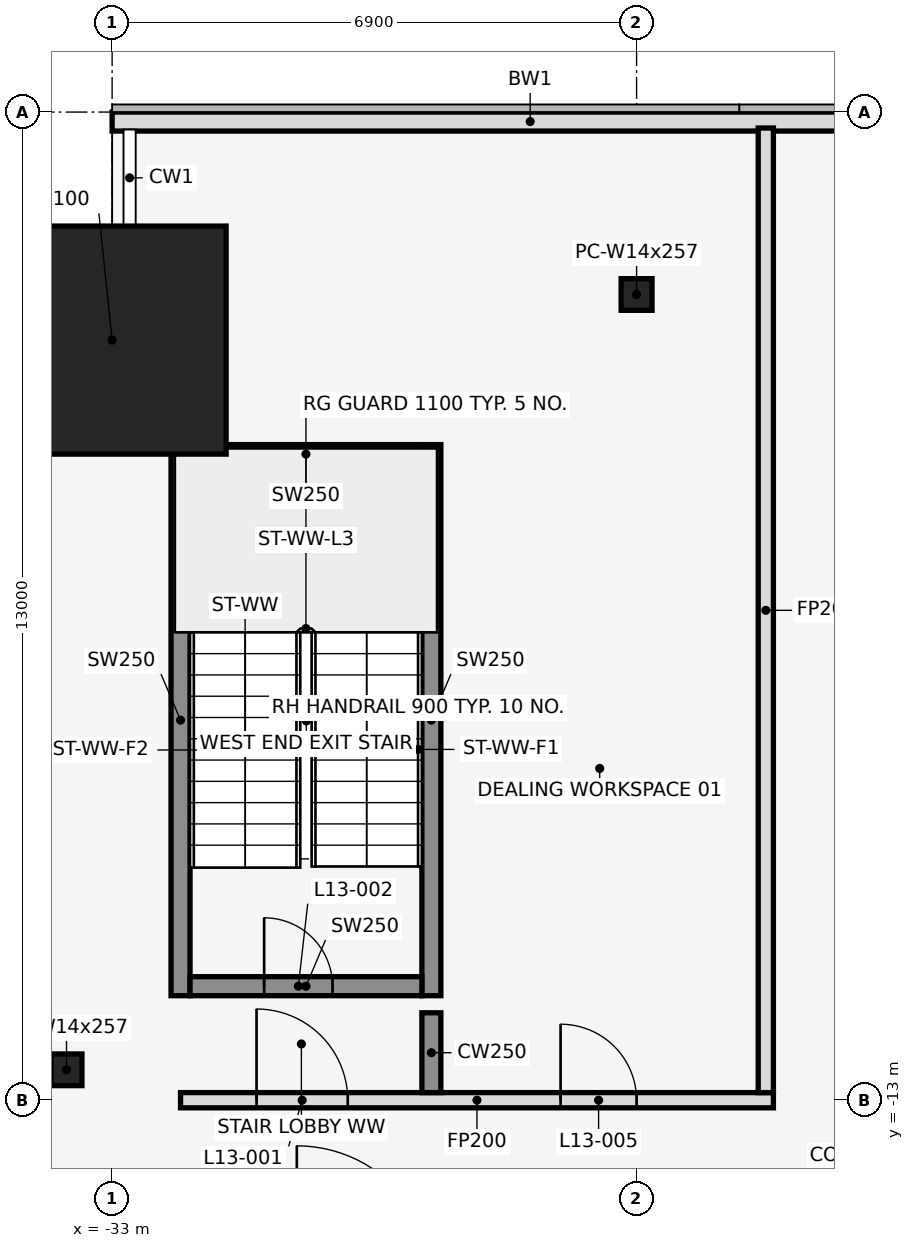
"""IFC4 building model, lengths in metres.
Left out: names, types, materials, properties, quantities, classifications, styles, units other than length and angle.
Written with IfcOpenShell. Run it as: python <this file> out.ifc"""

import sys

from ifc_helpers import new_model, si_unit, direction, frame, frame_2d, origin, origin_2d, place, context, subcontext, project, spatial, rectangle, hollow_rectangle, i_section, extrude, element, fill, save


model = new_model("IFC4")
c1 = context("Model", 3, precision=1e-05, world=origin(), true_north=direction((0.0, 1.0)))
c2 = subcontext(c1, "Body", "Model", "MODEL_VIEW")
j1 = project(units=[si_unit("LENGTHUNIT", "METRE"), si_unit("PLANEANGLEUNIT", "RADIAN")], contexts=[c1])
p1 = place(None, origin())
s1 = spatial("IfcSite", under=j1, at=p1, CompositionType="ELEMENT")
p2 = place(p1, origin())
s2 = spatial("IfcBuilding", under=s1, at=p2, CompositionType="ELEMENT")
p3 = place(p2, frame((0.0, 0.0, 66.5)))
s3 = spatial("IfcBuildingStorey", under=s2, at=p3, CompositionType="ELEMENT", Elevation=66.5)
p4 = place(p3, frame((-33.0, -3.0, 0.0), z_axis=(0.0, 0.0, 1.0), x_axis=(1.0, 0.0, 0.0)))
e1 = element("IfcColumn", 1, at=p4, inside=s3, PredefinedType="COLUMN", context=c2, shape_type="SweptSolid", body=[
    extrude(hollow_rectangle(XDim=3.0, YDim=3.0, WallThickness=0.1, at=origin_2d()), origin(), (0.0, 0.0, 1.0), 4.5),
])
for number, where, z_axis, x_axis in (
    (2, (-26.1, -2.4, 0.0), (0.0, 0.0, 1.0), (1.0, 0.0, 0.0)),
    (3, (-33.6, -12.6, 0.0), (0.0, 0.0, 1.0), (1.0, 0.0, 0.0)),
):
    element("IfcColumn", number, at=place(p3, frame(where, z_axis=z_axis, x_axis=x_axis)), inside=s3, PredefinedType="COLUMN", context=c2, shape_type="SweptSolid", body=[
        extrude(i_section(OverallWidth=0.406, OverallDepth=0.417, WebThickness=0.03, FlangeThickness=0.048, at=origin_2d()), origin(), (0.0, 0.0, 1.0), 4.5),
    ])
p5 = place(p3, frame((-22.0, -0.125, 0.0), z_axis=(0.0, 0.0, 1.0), x_axis=(-1.0, 0.0, 0.0)))
e4 = element("IfcWall", 4, at=p5, inside=s3, PredefinedType="STANDARD", context=c2, shape_type="SweptSolid", body=[
    extrude(rectangle(XDim=11.0, YDim=0.25, at=frame_2d((5.5, 0.0))), origin(), (0.0, 0.0, 1.0), 4.35),
])
for number, where, z_axis, x_axis in (
    (5, (-32.1, -11.625, 0.0), (0.0, 0.0, 1.0), (0.0, 1.0, 0.0)),
    (6, (-28.8, -11.625, 0.0), (0.0, 0.0, 1.0), (0.0, 1.0, 0.0)),
):
    element("IfcWall", number, at=place(p3, frame(where, z_axis=z_axis, x_axis=x_axis)), inside=s3, PredefinedType="SHEAR", context=c2, shape_type="SweptSolid", body=[
        extrude(rectangle(XDim=7.25, YDim=0.25, at=frame_2d((3.625, 0.0))), origin(), (0.0, 0.0, 1.0), 4.5),
    ])
p6 = place(p3, frame((-31.975, -11.5, 0.0), z_axis=(0.0, 0.0, 1.0), x_axis=(1.0, 0.0, 0.0)))
e7 = element("IfcWall", 7, at=p6, inside=s3, PredefinedType="SHEAR", context=c2, shape_type="SweptSolid", body=[
    extrude(rectangle(XDim=3.05, YDim=0.25, at=frame_2d((1.525, 0.0))), origin(), (0.0, 0.0, 1.0), 4.5),
])
p7 = place(p6, frame((0.975, 0.0, 0.0)))
e8 = element("IfcOpeningElement", 8, at=p7, cuts=e7, PredefinedType="OPENING", context=c2, shape_type="SweptSolid", body=[
    extrude(rectangle(XDim=0.9, YDim=2.1, at=frame_2d((0.45, 1.05))), frame((0.0, 0.137, 0.0), z_axis=(0.0, -1.0, 0.0), x_axis=(1.0, 0.0, 0.0)), (0.0, 0.0, 1.0), 0.274),
])
p8 = place(p3, frame((-31.975, -4.5, 0.0), z_axis=(0.0, 0.0, 1.0), x_axis=(1.0, 0.0, 0.0)))
e9 = element("IfcWall", 9, at=p8, inside=s3, PredefinedType="SHEAR", context=c2, shape_type="SweptSolid", body=[
    extrude(rectangle(XDim=3.05, YDim=0.25, at=frame_2d((1.525, 0.0))), origin(), (0.0, 0.0, 1.0), 4.5),
])
p9 = place(p3, frame((-32.1, -13.0, 0.0), z_axis=(0.0, 0.0, 1.0), x_axis=(1.0, 0.0, 0.0)))
e10 = element("IfcWall", 10, at=p9, inside=s3, PredefinedType="PARTITIONING", context=c2, shape_type="SweptSolid", body=[
    extrude(rectangle(XDim=7.8, YDim=0.2, at=frame_2d((3.9, 0.0))), origin(), (0.0, 0.0, 1.0), 3.418),
])
p10 = place(p9, frame((1.0, 0.0, 0.0)))
e11 = element("IfcOpeningElement", 11, at=p10, cuts=e10, PredefinedType="OPENING", context=c2, shape_type="SweptSolid", body=[
    extrude(rectangle(XDim=1.2, YDim=2.1, at=frame_2d((0.6, 1.05))), frame((0.0, 0.112, 0.0), z_axis=(0.0, -1.0, 0.0), x_axis=(1.0, 0.0, 0.0)), (0.0, 0.0, 1.0), 0.224),
])
p11 = place(p9, frame((5.0, 0.0, 0.0)))
e12 = element("IfcOpeningElement", 12, at=p11, cuts=e10, PredefinedType="OPENING", context=c2, shape_type="SweptSolid", body=[
    extrude(rectangle(XDim=1.0, YDim=2.1, at=frame_2d((0.5, 1.05))), frame((0.0, 0.112, 0.0), z_axis=(0.0, -1.0, 0.0), x_axis=(1.0, 0.0, 0.0)), (0.0, 0.0, 1.0), 0.224),
])
p12 = place(p3, frame((-28.8, -12.9, 0.0), z_axis=(0.0, 0.0, 1.0), x_axis=(0.0, 1.0, 0.0)))
e13 = element("IfcWall", 13, at=p12, inside=s3, PredefinedType="SHEAR", context=c2, shape_type="SweptSolid", body=[
    extrude(rectangle(XDim=1.05, YDim=0.25, at=frame_2d((0.525, 0.0))), origin(), (0.0, 0.0, 1.0), 4.5),
])
p13 = place(p3, frame((-24.4, -12.9, 0.0), z_axis=(0.0, 0.0, 1.0), x_axis=(0.0, 1.0, 0.0)))
e14 = element("IfcWall", 14, at=p13, inside=s3, PredefinedType="PARTITIONING", context=c2, shape_type="SweptSolid", body=[
    extrude(rectangle(XDim=12.69, YDim=0.2, at=frame_2d((6.345, 0.0))), origin(), (0.0, 0.0, 1.0), 3.418),
])
p14 = place(p10, origin())
e15 = element("IfcDoor", 15, at=p14, inside=s3, OperationType="SINGLE_SWING_LEFT", PredefinedType="DOOR", context=c2, shape_type="SweptSolid", body=[
    extrude(rectangle(XDim=1.2, YDim=2.1, at=frame_2d((0.6, 1.05))), frame((0.0, 0.025, 0.0), z_axis=(0.0, -1.0, 0.0), x_axis=(1.0, 0.0, 0.0)), (0.0, 0.0, 1.0), 0.05),
])
fill(e11, e15)
p15 = place(p7, origin())
e16 = element("IfcDoor", 16, at=p15, inside=s3, OperationType="SINGLE_SWING_LEFT", PredefinedType="DOOR", context=c2, shape_type="SweptSolid", body=[
    extrude(rectangle(XDim=0.9, YDim=2.1, at=frame_2d((0.45, 1.05))), frame((0.0, 0.025, 0.0), z_axis=(0.0, -1.0, 0.0), x_axis=(1.0, 0.0, 0.0)), (0.0, 0.0, 1.0), 0.05),
])
fill(e8, e16)
p16 = place(p11, origin())
e17 = element("IfcDoor", 17, at=p16, inside=s3, OperationType="SINGLE_SWING_LEFT", PredefinedType="DOOR", context=c2, shape_type="SweptSolid", body=[
    extrude(rectangle(XDim=1.0, YDim=2.1, at=frame_2d((0.5, 1.05))), frame((0.0, 0.025, 0.0), z_axis=(0.0, -1.0, 0.0), x_axis=(1.0, 0.0, 0.0)), (0.0, 0.0, 1.0), 0.05),
])
fill(e12, e17)
save(model, sys.argv[1])
